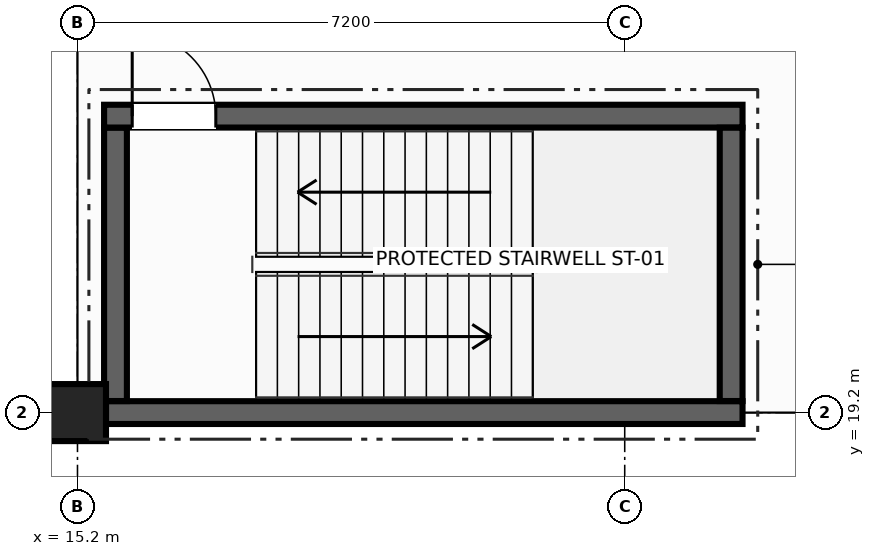
"""IFC4 building model, lengths in metres.
Left out: names, types, materials, properties, quantities, classifications, styles, units other than length and angle.
Written with IfcOpenShell. Run it as: python <this file> out.ifc"""

import sys

from ifc_helpers import new_model, si_unit, direction, frame, frame_2d, origin, origin_2d, place, context, subcontext, project, spatial, rectangle, extrude, element, fill, save


model = new_model("IFC4")
c1 = context("Model", 3, precision=1e-05, world=origin(), true_north=direction((0.0, 1.0)))
c2 = subcontext(c1, "Body", "Model", "MODEL_VIEW")
j1 = project(units=[si_unit("LENGTHUNIT", "METRE"), si_unit("PLANEANGLEUNIT", "RADIAN")], contexts=[c1])
p1 = place(None, origin())
s1 = spatial("IfcSite", under=j1, at=p1, CompositionType="ELEMENT")
p2 = place(p1, origin())
s2 = spatial("IfcBuilding", under=s1, at=p2, CompositionType="ELEMENT")
p3 = place(p2, frame((0.0, 0.0, -4.8)))
s3 = spatial("IfcBuildingStorey", under=s2, at=p3, CompositionType="ELEMENT", Elevation=-4.8)
p4 = place(p3, frame((15.2, 19.2, 0.0), z_axis=(0.0, 0.0, 1.0), x_axis=(1.0, 0.0, 0.0)))
e1 = element("IfcColumn", 1, at=p4, inside=s3, PredefinedType="COLUMN", context=c2, shape_type="SweptSolid", body=[
    extrude(rectangle(XDim=0.75, YDim=0.75, at=origin_2d()), origin(), (0.0, 0.0, 1.0), 4.8),
])
p5 = place(p3, frame((23.95, 19.2, 0.0), z_axis=(0.0, 0.0, 1.0), x_axis=(-1.0, 0.0, 0.0)))
e2 = element("IfcWall", 2, at=p5, inside=s3, PredefinedType="SHEAR", context=c2, shape_type="SweptSolid", body=[
    extrude(rectangle(XDim=8.375, YDim=0.3, at=frame_2d((4.188, 0.0))), origin(), (0.0, 0.0, 1.0), 4.5),
])
p6 = place(p3, frame((15.7, 19.352, 0.0), z_axis=(0.0, 0.0, 1.0), x_axis=(0.0, 1.0, 0.0)))
e3 = element("IfcWall", 3, at=p6, inside=s3, PredefinedType="SHEAR", context=c2, shape_type="SweptSolid", body=[
    extrude(rectangle(XDim=3.598, YDim=0.3, at=frame_2d((1.799, 0.0))), origin(), (0.0, 0.0, 1.0), 4.5),
])
p7 = place(p3, frame((15.55, 23.1, 0.0), z_axis=(0.0, 0.0, 1.0), x_axis=(1.0, 0.0, 0.0)))
e4 = element("IfcWall", 4, at=p7, inside=s3, PredefinedType="SHEAR", context=c2, shape_type="SweptSolid", body=[
    extrude(rectangle(XDim=8.4, YDim=0.3, at=frame_2d((4.2, 0.0))), origin(), (0.0, 0.0, 1.0), 4.5),
])
p8 = place(p7, frame((0.37, 0.0, 0.0)))
e5 = element("IfcOpeningElement", 5, at=p8, cuts=e4, PredefinedType="OPENING", context=c2, shape_type="SweptSolid", body=[
    extrude(rectangle(XDim=1.1, YDim=2.15, at=frame_2d((0.55, 1.075))), frame((0.0, 0.16, 0.0), z_axis=(0.0, -1.0, 0.0), x_axis=(1.0, 0.0, 0.0)), (0.0, 0.0, 1.0), 0.32),
])
p9 = place(p3, frame((23.8, 22.948, 0.0), z_axis=(0.0, 0.0, 1.0), x_axis=(0.0, -1.0, 0.0)))
e6 = element("IfcWall", 6, at=p9, inside=s3, PredefinedType="SHEAR", context=c2, shape_type="SweptSolid", body=[
    extrude(rectangle(XDim=3.596, YDim=0.3, at=frame_2d((1.798, 0.0))), origin(), (0.0, 0.0, 1.0), 4.5),
])
p10 = place(p8, origin())
e7 = element("IfcDoor", 7, at=p10, inside=s3, OperationType="SINGLE_SWING_LEFT", PredefinedType="DOOR", context=c2, shape_type="SweptSolid", body=[
    extrude(rectangle(XDim=1.1, YDim=2.15, at=frame_2d((0.55, 1.075))), frame((0.0, 0.025, 0.0), z_axis=(0.0, -1.0, 0.0), x_axis=(1.0, 0.0, 0.0)), (0.0, 0.0, 1.0), 0.05),
])
fill(e5, e7)
save(model, sys.argv[1])
